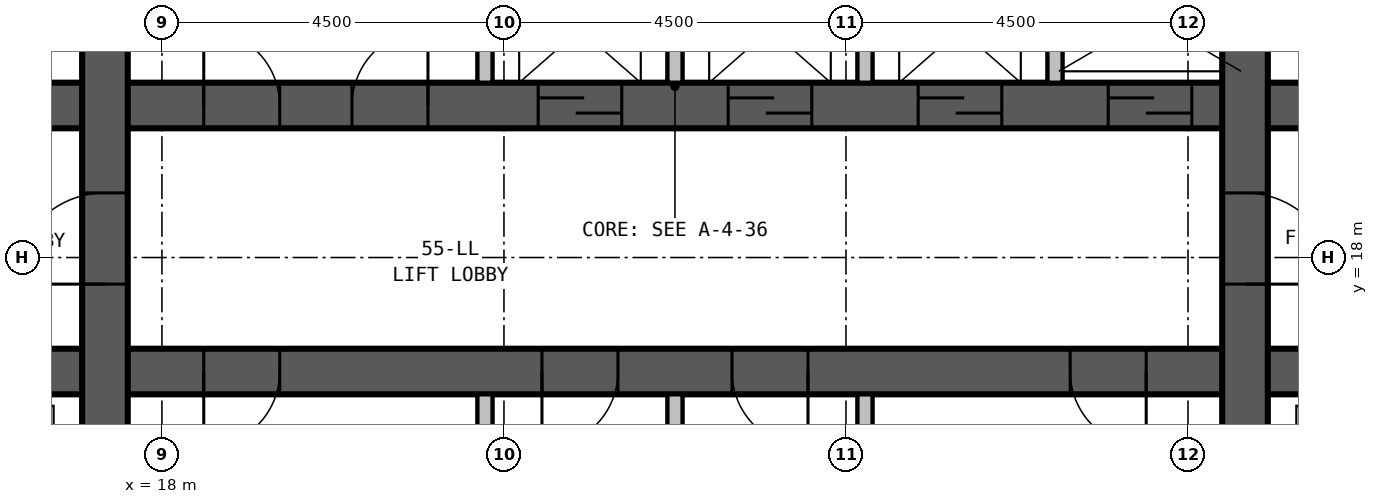
"""IFC4 building model, lengths in metres.
Left out: names, types, materials, properties, quantities, classifications, styles, units other than length and angle.
Written with IfcOpenShell. Run it as: python <this file> out.ifc"""

import sys

from ifc_helpers import new_model, si_unit, direction, frame, frame_2d, origin, place, context, subcontext, project, spatial, rectangle, extrude, element, fill, save


model = new_model("IFC4")
c1 = context("Model", 3, precision=1e-05, world=origin(), true_north=direction((0.0, 1.0)))
c2 = subcontext(c1, "Body", "Model", "MODEL_VIEW")
j1 = project(units=[si_unit("LENGTHUNIT", "METRE"), si_unit("PLANEANGLEUNIT", "RADIAN")], contexts=[c1])
p1 = place(None, origin())
s1 = spatial("IfcSite", under=j1, at=p1, CompositionType="ELEMENT")
p2 = place(p1, origin())
s2 = spatial("IfcBuilding", under=s1, at=p2, CompositionType="ELEMENT")
p3 = place(p2, frame((0.0, 0.0, 211.4)))
s3 = spatial("IfcBuildingStorey", under=s2, at=p3, CompositionType="ELEMENT", Elevation=211.4)
p4 = place(p3, frame((17.25, 13.8, 0.0), z_axis=(0.0, 0.0, 1.0), x_axis=(0.0, 1.0, 0.0)))
e1 = element("IfcWall", 1, at=p4, inside=s3, PredefinedType="SHEAR", context=c2, shape_type="SweptSolid", body=[
    extrude(rectangle(XDim=12.9, YDim=0.6, at=frame_2d((6.45, 0.0))), origin(), (0.0, 0.0, 1.0), 6.0),
])
p5 = place(p4, frame((3.85, 0.0, 0.0)))
e2 = element("IfcOpeningElement", 2, at=p5, cuts=e1, PredefinedType="OPENING", context=c2, shape_type="SweptSolid", body=[
    extrude(rectangle(XDim=1.2, YDim=2.1, at=frame_2d((0.6, 1.05))), frame((0.0, 0.31, 0.0), z_axis=(0.0, -1.0, 0.0), x_axis=(1.0, 0.0, 0.0)), (0.0, 0.0, 1.0), 0.62),
])
p6 = place(p3, frame((32.25, 13.8, 0.0), z_axis=(0.0, 0.0, 1.0), x_axis=(0.0, 1.0, 0.0)))
e3 = element("IfcWall", 3, at=p6, inside=s3, PredefinedType="SHEAR", context=c2, shape_type="SweptSolid", body=[
    extrude(rectangle(XDim=12.9, YDim=0.6, at=frame_2d((6.45, 0.0))), origin(), (0.0, 0.0, 1.0), 6.0),
])
p7 = place(p6, frame((5.05, 0.0, 0.0), z_axis=(0.0, 0.0, 1.0), x_axis=(-1.0, 0.0, 0.0)))
e4 = element("IfcOpeningElement", 4, at=p7, cuts=e3, PredefinedType="OPENING", context=c2, shape_type="SweptSolid", body=[
    extrude(rectangle(XDim=1.2, YDim=2.1, at=frame_2d((0.6, 1.05))), frame((0.0, 0.31, 0.0), z_axis=(0.0, -1.0, 0.0), x_axis=(1.0, 0.0, 0.0)), (0.0, 0.0, 1.0), 0.62),
])
p8 = place(p3, frame((13.8, 16.5, 0.0), z_axis=(0.0, 0.0, 1.0), x_axis=(1.0, 0.0, 0.0)))
e5 = element("IfcWall", 5, at=p8, inside=s3, PredefinedType="SHEAR", context=c2, shape_type="SweptSolid", body=[
    extrude(rectangle(XDim=21.9, YDim=0.6, at=frame_2d((10.95, 0.0))), origin(), (0.0, 0.0, 1.0), 6.0),
])
p9 = place(p8, frame((5.75, 0.0, 0.0), z_axis=(0.0, 0.0, 1.0), x_axis=(-1.0, 0.0, 0.0)))
e6 = element("IfcOpeningElement", 6, at=p9, cuts=e5, PredefinedType="OPENING", context=c2, shape_type="SweptSolid", body=[
    extrude(rectangle(XDim=1.0, YDim=2.1, at=frame_2d((0.5, 1.05))), frame((0.0, 0.31, 0.0), z_axis=(0.0, -1.0, 0.0), x_axis=(1.0, 0.0, 0.0)), (0.0, 0.0, 1.0), 0.62),
])
p10 = place(p8, frame((10.2, 0.0, 0.0), z_axis=(0.0, 0.0, 1.0), x_axis=(-1.0, 0.0, 0.0)))
e7 = element("IfcOpeningElement", 7, at=p10, cuts=e5, PredefinedType="OPENING", context=c2, shape_type="SweptSolid", body=[
    extrude(rectangle(XDim=1.0, YDim=2.1, at=frame_2d((0.5, 1.05))), frame((0.0, 0.31, 0.0), z_axis=(0.0, -1.0, 0.0), x_axis=(1.0, 0.0, 0.0)), (0.0, 0.0, 1.0), 0.62),
])
p11 = place(p8, frame((12.7, 0.0, 0.0), z_axis=(0.0, 0.0, 1.0), x_axis=(-1.0, 0.0, 0.0)))
e8 = element("IfcOpeningElement", 8, at=p11, cuts=e5, PredefinedType="OPENING", context=c2, shape_type="SweptSolid", body=[
    extrude(rectangle(XDim=1.0, YDim=2.1, at=frame_2d((0.5, 1.05))), frame((0.0, 0.31, 0.0), z_axis=(0.0, -1.0, 0.0), x_axis=(1.0, 0.0, 0.0)), (0.0, 0.0, 1.0), 0.62),
])
p12 = place(p8, frame((17.15, 0.0, 0.0), z_axis=(0.0, 0.0, 1.0), x_axis=(-1.0, 0.0, 0.0)))
e9 = element("IfcOpeningElement", 9, at=p12, cuts=e5, PredefinedType="OPENING", context=c2, shape_type="SweptSolid", body=[
    extrude(rectangle(XDim=1.0, YDim=2.1, at=frame_2d((0.5, 1.05))), frame((0.0, 0.31, 0.0), z_axis=(0.0, -1.0, 0.0), x_axis=(1.0, 0.0, 0.0)), (0.0, 0.0, 1.0), 0.62),
])
p13 = place(p8, frame((0.6, 0.0, 0.0)))
e10 = element("IfcOpeningElement", 10, at=p13, cuts=e5, PredefinedType="OPENING", context=c2, shape_type="SweptSolid", body=[
    extrude(rectangle(XDim=1.2, YDim=2.1, at=frame_2d((0.6, 1.05))), frame((0.0, 0.31, 0.0), z_axis=(0.0, -1.0, 0.0), x_axis=(1.0, 0.0, 0.0)), (0.0, 0.0, 1.0), 0.62),
])
p14 = place(p8, frame((19.6, 0.0, 0.0)))
e11 = element("IfcOpeningElement", 11, at=p14, cuts=e5, PredefinedType="OPENING", context=c2, shape_type="SweptSolid", body=[
    extrude(rectangle(XDim=1.2, YDim=2.1, at=frame_2d((0.6, 1.05))), frame((0.0, 0.31, 0.0), z_axis=(0.0, -1.0, 0.0), x_axis=(1.0, 0.0, 0.0)), (0.0, 0.0, 1.0), 0.62),
])
p15 = place(p3, frame((13.8, 20.0, 0.0), z_axis=(0.0, 0.0, 1.0), x_axis=(1.0, 0.0, 0.0)))
e12 = element("IfcWall", 12, at=p15, inside=s3, PredefinedType="SHEAR", context=c2, shape_type="SweptSolid", body=[
    extrude(rectangle(XDim=21.9, YDim=0.6, at=frame_2d((10.95, 0.0))), origin(), (0.0, 0.0, 1.0), 6.0),
])
p16 = place(p15, frame((0.5, 0.0, 0.0)))
e13 = element("IfcOpeningElement", 13, at=p16, cuts=e12, PredefinedType="OPENING", context=c2, shape_type="SweptSolid", body=[
    extrude(rectangle(XDim=1.0, YDim=2.1, at=frame_2d((0.5, 1.05))), frame((0.0, 0.31, 0.0), z_axis=(0.0, -1.0, 0.0), x_axis=(1.0, 0.0, 0.0)), (0.0, 0.0, 1.0), 0.62),
])
p17 = place(p15, frame((20.5, 0.0, 0.0)))
e14 = element("IfcOpeningElement", 14, at=p17, cuts=e12, PredefinedType="OPENING", context=c2, shape_type="SweptSolid", body=[
    extrude(rectangle(XDim=1.0, YDim=2.1, at=frame_2d((0.5, 1.05))), frame((0.0, 0.31, 0.0), z_axis=(0.0, -1.0, 0.0), x_axis=(1.0, 0.0, 0.0)), (0.0, 0.0, 1.0), 0.62),
])
p18 = place(p15, frame((9.15, 0.0, 0.0)))
e15 = element("IfcOpeningElement", 15, at=p18, cuts=e12, PredefinedType="OPENING", context=c2, shape_type="SweptSolid", body=[
    extrude(rectangle(XDim=1.1, YDim=2.1, at=frame_2d((0.55, 1.05))), frame((0.0, 0.31, 0.0), z_axis=(0.0, -1.0, 0.0), x_axis=(1.0, 0.0, 0.0)), (0.0, 0.0, 1.0), 0.62),
])
p19 = place(p15, frame((11.65, 0.0, 0.0)))
e16 = element("IfcOpeningElement", 16, at=p19, cuts=e12, PredefinedType="OPENING", context=c2, shape_type="SweptSolid", body=[
    extrude(rectangle(XDim=1.1, YDim=2.1, at=frame_2d((0.55, 1.05))), frame((0.0, 0.31, 0.0), z_axis=(0.0, -1.0, 0.0), x_axis=(1.0, 0.0, 0.0)), (0.0, 0.0, 1.0), 0.62),
])
p20 = place(p15, frame((14.15, 0.0, 0.0)))
e17 = element("IfcOpeningElement", 17, at=p20, cuts=e12, PredefinedType="OPENING", context=c2, shape_type="SweptSolid", body=[
    extrude(rectangle(XDim=1.1, YDim=2.1, at=frame_2d((0.55, 1.05))), frame((0.0, 0.31, 0.0), z_axis=(0.0, -1.0, 0.0), x_axis=(1.0, 0.0, 0.0)), (0.0, 0.0, 1.0), 0.62),
])
p21 = place(p15, frame((16.65, 0.0, 0.0)))
e18 = element("IfcOpeningElement", 18, at=p21, cuts=e12, PredefinedType="OPENING", context=c2, shape_type="SweptSolid", body=[
    extrude(rectangle(XDim=1.1, YDim=2.1, at=frame_2d((0.55, 1.05))), frame((0.0, 0.31, 0.0), z_axis=(0.0, -1.0, 0.0), x_axis=(1.0, 0.0, 0.0)), (0.0, 0.0, 1.0), 0.62),
])
p22 = place(p15, frame((4.75, 0.0, 0.0)))
e19 = element("IfcOpeningElement", 19, at=p22, cuts=e12, PredefinedType="OPENING", context=c2, shape_type="SweptSolid", body=[
    extrude(rectangle(XDim=1.0, YDim=2.1, at=frame_2d((0.5, 1.05))), frame((0.0, 0.31, 0.0), z_axis=(0.0, -1.0, 0.0), x_axis=(1.0, 0.0, 0.0)), (0.0, 0.0, 1.0), 0.62),
])
p23 = place(p15, frame((6.7, 0.0, 0.0)))
e20 = element("IfcOpeningElement", 20, at=p23, cuts=e12, PredefinedType="OPENING", context=c2, shape_type="SweptSolid", body=[
    extrude(rectangle(XDim=1.0, YDim=2.1, at=frame_2d((0.5, 1.05))), frame((0.0, 0.31, 0.0), z_axis=(0.0, -1.0, 0.0), x_axis=(1.0, 0.0, 0.0)), (0.0, 0.0, 1.0), 0.62),
])
p24 = place(p3, frame((22.25, 13.8, 0.0), z_axis=(0.0, 0.0, 1.0), x_axis=(0.0, 1.0, 0.0)))
e21 = element("IfcWall", 21, at=p24, inside=s3, PredefinedType="PARTITIONING", context=c2, shape_type="SweptSolid", body=[
    extrude(rectangle(XDim=2.4, YDim=0.2, at=frame_2d((1.2, 0.0))), origin(), (0.0, 0.0, 1.0), 5.75),
])
p25 = place(p3, frame((22.25, 20.3, 0.0), z_axis=(0.0, 0.0, 1.0), x_axis=(0.0, 1.0, 0.0)))
e22 = element("IfcWall", 22, at=p25, inside=s3, PredefinedType="PARTITIONING", context=c2, shape_type="SweptSolid", body=[
    extrude(rectangle(XDim=3.1, YDim=0.2, at=frame_2d((1.55, 0.0))), origin(), (0.0, 0.0, 1.0), 5.75),
])
p26 = place(p3, frame((24.75, 13.8, 0.0), z_axis=(0.0, 0.0, 1.0), x_axis=(0.0, 1.0, 0.0)))
e23 = element("IfcWall", 23, at=p26, inside=s3, PredefinedType="PARTITIONING", context=c2, shape_type="SweptSolid", body=[
    extrude(rectangle(XDim=2.4, YDim=0.2, at=frame_2d((1.2, 0.0))), origin(), (0.0, 0.0, 1.0), 5.75),
])
p27 = place(p3, frame((24.75, 20.3, 0.0), z_axis=(0.0, 0.0, 1.0), x_axis=(0.0, 1.0, 0.0)))
e24 = element("IfcWall", 24, at=p27, inside=s3, PredefinedType="PARTITIONING", context=c2, shape_type="SweptSolid", body=[
    extrude(rectangle(XDim=3.1, YDim=0.2, at=frame_2d((1.55, 0.0))), origin(), (0.0, 0.0, 1.0), 5.75),
])
p28 = place(p3, frame((27.25, 13.8, 0.0), z_axis=(0.0, 0.0, 1.0), x_axis=(0.0, 1.0, 0.0)))
e25 = element("IfcWall", 25, at=p28, inside=s3, PredefinedType="PARTITIONING", context=c2, shape_type="SweptSolid", body=[
    extrude(rectangle(XDim=2.4, YDim=0.2, at=frame_2d((1.2, 0.0))), origin(), (0.0, 0.0, 1.0), 5.75),
])
for number, where, z_axis, x_axis in (
    (26, (27.25, 20.3, 0.0), (0.0, 0.0, 1.0), (0.0, 1.0, 0.0)),
    (27, (29.75, 20.3, 0.0), (0.0, 0.0, 1.0), (0.0, 1.0, 0.0)),
):
    element("IfcWall", number, at=place(p3, frame(where, z_axis=z_axis, x_axis=x_axis)), inside=s3, PredefinedType="PARTITIONING", context=c2, shape_type="SweptSolid", body=[
        extrude(rectangle(XDim=3.1, YDim=0.2, at=frame_2d((1.55, 0.0))), origin(), (0.0, 0.0, 1.0), 5.75),
    ])
p29 = place(p5, origin())
e28 = element("IfcDoor", 28, at=p29, inside=s3, OperationType="SINGLE_SWING_LEFT", PredefinedType="DOOR", context=c2, shape_type="SweptSolid", body=[
    extrude(rectangle(XDim=1.2, YDim=2.1, at=frame_2d((0.6, 1.05))), frame((0.0, 0.3, 0.0), z_axis=(0.0, -1.0, 0.0), x_axis=(1.0, 0.0, 0.0)), (0.0, 0.0, 1.0), 0.6),
])
fill(e2, e28)
p30 = place(p7, origin())
e29 = element("IfcDoor", 29, at=p30, inside=s3, OperationType="SINGLE_SWING_RIGHT", PredefinedType="DOOR", context=c2, shape_type="SweptSolid", body=[
    extrude(rectangle(XDim=1.2, YDim=2.1, at=frame_2d((0.6, 1.05))), frame((0.0, 0.3, 0.0), z_axis=(0.0, -1.0, 0.0), x_axis=(1.0, 0.0, 0.0)), (0.0, 0.0, 1.0), 0.6),
])
fill(e4, e29)
p31 = place(p18, origin())
e30 = element("IfcDoor", 30, at=p31, inside=s3, OperationType="SLIDING_TO_LEFT", PredefinedType="DOOR", context=c2, shape_type="SweptSolid", body=[
    extrude(rectangle(XDim=1.1, YDim=2.1, at=frame_2d((0.55, 1.05))), frame((0.0, 0.3, 0.0), z_axis=(0.0, -1.0, 0.0), x_axis=(1.0, 0.0, 0.0)), (0.0, 0.0, 1.0), 0.6),
])
fill(e15, e30)
p32 = place(p19, origin())
e31 = element("IfcDoor", 31, at=p32, inside=s3, OperationType="SLIDING_TO_LEFT", PredefinedType="DOOR", context=c2, shape_type="SweptSolid", body=[
    extrude(rectangle(XDim=1.1, YDim=2.1, at=frame_2d((0.55, 1.05))), frame((0.0, 0.3, 0.0), z_axis=(0.0, -1.0, 0.0), x_axis=(1.0, 0.0, 0.0)), (0.0, 0.0, 1.0), 0.6),
])
fill(e16, e31)
p33 = place(p20, origin())
e32 = element("IfcDoor", 32, at=p33, inside=s3, OperationType="SLIDING_TO_LEFT", PredefinedType="DOOR", context=c2, shape_type="SweptSolid", body=[
    extrude(rectangle(XDim=1.1, YDim=2.1, at=frame_2d((0.55, 1.05))), frame((0.0, 0.3, 0.0), z_axis=(0.0, -1.0, 0.0), x_axis=(1.0, 0.0, 0.0)), (0.0, 0.0, 1.0), 0.6),
])
fill(e17, e32)
p34 = place(p21, origin())
e33 = element("IfcDoor", 33, at=p34, inside=s3, OperationType="SLIDING_TO_LEFT", PredefinedType="DOOR", context=c2, shape_type="SweptSolid", body=[
    extrude(rectangle(XDim=1.1, YDim=2.1, at=frame_2d((0.55, 1.05))), frame((0.0, 0.3, 0.0), z_axis=(0.0, -1.0, 0.0), x_axis=(1.0, 0.0, 0.0)), (0.0, 0.0, 1.0), 0.6),
])
fill(e18, e33)
p35 = place(p9, origin())
e34 = element("IfcDoor", 34, at=p35, inside=s3, OperationType="SINGLE_SWING_RIGHT", PredefinedType="DOOR", context=c2, shape_type="SweptSolid", body=[
    extrude(rectangle(XDim=1.0, YDim=2.1, at=frame_2d((0.5, 1.05))), frame((0.0, 0.3, 0.0), z_axis=(0.0, -1.0, 0.0), x_axis=(1.0, 0.0, 0.0)), (0.0, 0.0, 1.0), 0.6),
])
fill(e6, e34)
p36 = place(p10, origin())
e35 = element("IfcDoor", 35, at=p36, inside=s3, OperationType="SINGLE_SWING_RIGHT", PredefinedType="DOOR", context=c2, shape_type="SweptSolid", body=[
    extrude(rectangle(XDim=1.0, YDim=2.1, at=frame_2d((0.5, 1.05))), frame((0.0, 0.3, 0.0), z_axis=(0.0, -1.0, 0.0), x_axis=(1.0, 0.0, 0.0)), (0.0, 0.0, 1.0), 0.6),
])
fill(e7, e35)
p37 = place(p11, origin())
e36 = element("IfcDoor", 36, at=p37, inside=s3, OperationType="SINGLE_SWING_LEFT", PredefinedType="DOOR", context=c2, shape_type="SweptSolid", body=[
    extrude(rectangle(XDim=1.0, YDim=2.1, at=frame_2d((0.5, 1.05))), frame((0.0, 0.3, 0.0), z_axis=(0.0, -1.0, 0.0), x_axis=(1.0, 0.0, 0.0)), (0.0, 0.0, 1.0), 0.6),
])
fill(e8, e36)
p38 = place(p12, origin())
e37 = element("IfcDoor", 37, at=p38, inside=s3, OperationType="SINGLE_SWING_LEFT", PredefinedType="DOOR", context=c2, shape_type="SweptSolid", body=[
    extrude(rectangle(XDim=1.0, YDim=2.1, at=frame_2d((0.5, 1.05))), frame((0.0, 0.3, 0.0), z_axis=(0.0, -1.0, 0.0), x_axis=(1.0, 0.0, 0.0)), (0.0, 0.0, 1.0), 0.6),
])
fill(e9, e37)
p39 = place(p22, origin())
e38 = element("IfcDoor", 38, at=p39, inside=s3, OperationType="SINGLE_SWING_LEFT", PredefinedType="DOOR", context=c2, shape_type="SweptSolid", body=[
    extrude(rectangle(XDim=1.0, YDim=2.1, at=frame_2d((0.5, 1.05))), frame((0.0, 0.3, 0.0), z_axis=(0.0, -1.0, 0.0), x_axis=(1.0, 0.0, 0.0)), (0.0, 0.0, 1.0), 0.6),
])
fill(e19, e38)
p40 = place(p23, origin())
e39 = element("IfcDoor", 39, at=p40, inside=s3, OperationType="SINGLE_SWING_RIGHT", PredefinedType="DOOR", context=c2, shape_type="SweptSolid", body=[
    extrude(rectangle(XDim=1.0, YDim=2.1, at=frame_2d((0.5, 1.05))), frame((0.0, 0.3, 0.0), z_axis=(0.0, -1.0, 0.0), x_axis=(1.0, 0.0, 0.0)), (0.0, 0.0, 1.0), 0.6),
])
fill(e20, e39)
save(model, sys.argv[1])
